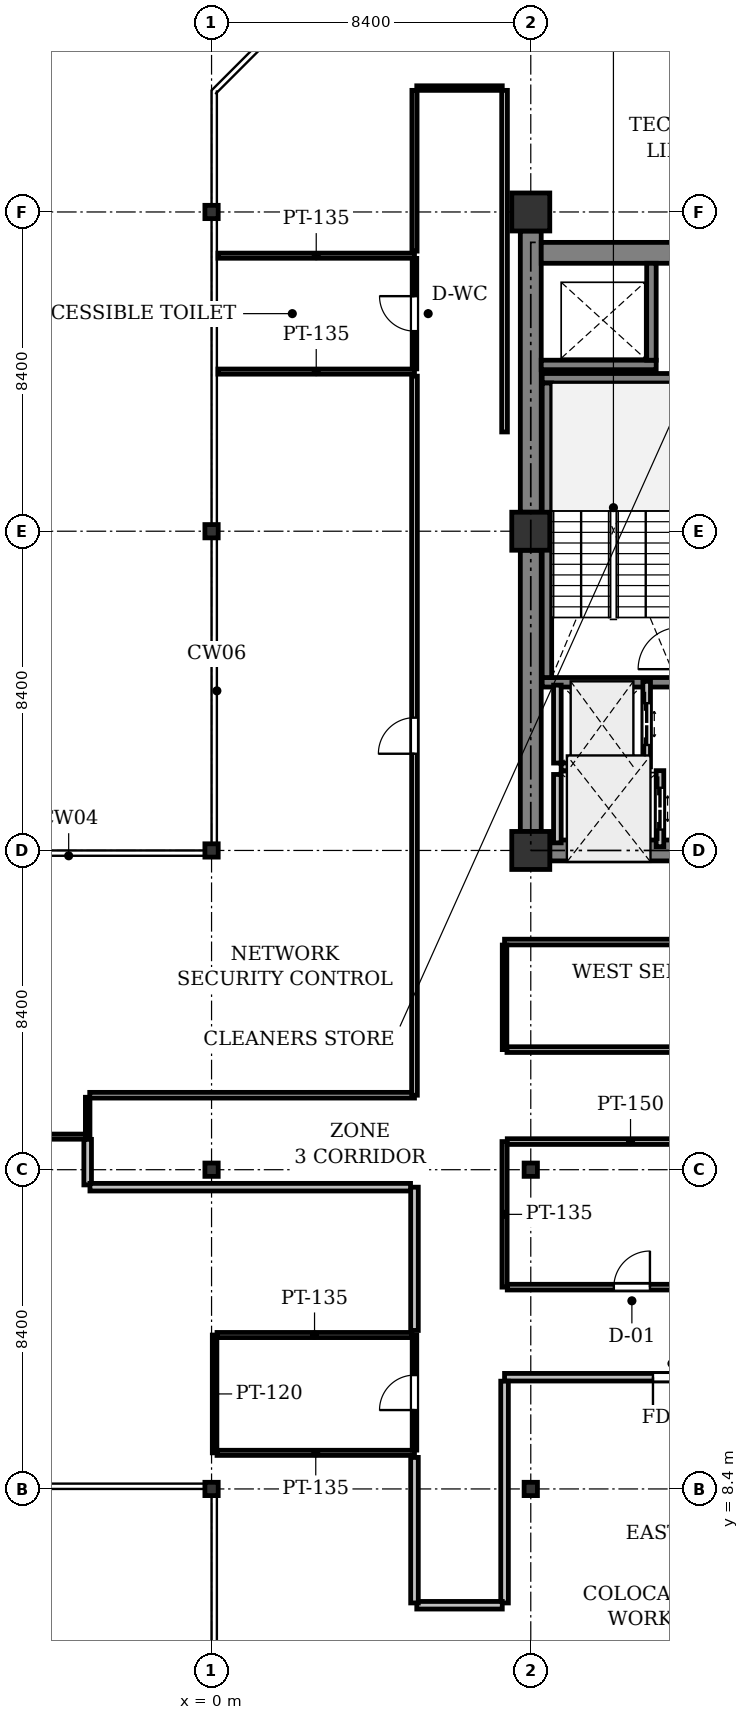
"""IFC4 building model, lengths in metres.
Left out: names, types, materials, properties, quantities, classifications, styles, units other than length and angle.
Written with IfcOpenShell. Run it as: python <this file> out.ifc"""

import sys

from ifc_helpers import new_model, si_unit, direction, frame, frame_2d, origin, origin_2d, place, context, subcontext, project, spatial, rectangle, i_section, extrude, element, fill, save


model = new_model("IFC4")
c1 = context("Model", 3, precision=1e-05, world=origin(), true_north=direction((0.0, 1.0)))
c2 = subcontext(c1, "Body", "Model", "MODEL_VIEW")
j1 = project(units=[si_unit("LENGTHUNIT", "METRE"), si_unit("PLANEANGLEUNIT", "RADIAN")], contexts=[c1])
p1 = place(None, origin())
s1 = spatial("IfcSite", under=j1, at=p1, CompositionType="ELEMENT")
p2 = place(p1, origin())
s2 = spatial("IfcBuilding", under=s1, at=p2, CompositionType="ELEMENT")
p3 = place(p2, frame((0.0, 0.0, 196.0)))
s3 = spatial("IfcBuildingStorey", under=s2, at=p3, CompositionType="ELEMENT", Elevation=196.0)
for number, where, z_axis, x_axis in (
    (1, (0.0, 8.4, 0.0), (0.0, 0.0, 1.0), (1.0, 0.0, 0.0)),
    (2, (0.0, 16.8, 0.0), (0.0, 0.0, 1.0), (1.0, 0.0, 0.0)),
    (3, (0.0, 25.2, 0.0), (0.0, 0.0, 1.0), (1.0, 0.0, 0.0)),
    (4, (0.0, 33.6, 0.0), (0.0, 0.0, 1.0), (1.0, 0.0, 0.0)),
    (5, (0.0, 42.0, 0.0), (0.0, 0.0, 1.0), (1.0, 0.0, 0.0)),
    (6, (8.4, 8.4, 0.0), (0.0, 0.0, 1.0), (1.0, 0.0, 0.0)),
    (7, (8.4, 16.8, 0.0), (0.0, 0.0, 1.0), (1.0, 0.0, 0.0)),
):
    element("IfcColumn", number, at=place(p3, frame(where, z_axis=z_axis, x_axis=x_axis)), inside=s3, PredefinedType="COLUMN", context=c2, shape_type="SweptSolid", body=[
        extrude(i_section(OverallWidth=0.35, OverallDepth=0.35, WebThickness=0.02, FlangeThickness=0.032, at=origin_2d()), origin(), (0.0, 0.0, 1.0), 4.1),
    ])
for number, where, z_axis, x_axis in (
    (8, (8.4, 25.2, 0.0), (0.0, 0.0, 1.0), (1.0, 0.0, 0.0)),
    (9, (8.4, 33.6, 0.0), (0.0, 0.0, 1.0), (1.0, 0.0, 0.0)),
    (10, (8.4, 42.0, 0.0), (0.0, 0.0, 1.0), (1.0, 0.0, 0.0)),
):
    element("IfcColumn", number, at=place(p3, frame(where, z_axis=z_axis, x_axis=x_axis)), inside=s3, PredefinedType="COLUMN", context=c2, shape_type="SweptSolid", body=[
        extrude(rectangle(XDim=1.0, YDim=1.0, at=origin_2d()), origin(), (0.0, 0.0, 1.0), 4.1),
    ])
p4 = place(p3, frame((8.4, 25.7, 0.0), z_axis=(0.0, 0.0, 1.0), x_axis=(0.0, 1.0, 0.0)))
e11 = element("IfcWall", 11, at=p4, inside=s3, PredefinedType="SHEAR", context=c2, shape_type="SweptSolid", body=[
    extrude(rectangle(XDim=7.4, YDim=0.55, at=frame_2d((3.7, 0.0))), origin(), (0.0, 0.0, 1.0), 3.825),
])
p5 = place(p3, frame((8.4, 34.1, 0.0), z_axis=(0.0, 0.0, 1.0), x_axis=(0.0, 1.0, 0.0)))
e12 = element("IfcWall", 12, at=p5, inside=s3, PredefinedType="SHEAR", context=c2, shape_type="SweptSolid", body=[
    extrude(rectangle(XDim=7.4, YDim=0.55, at=frame_2d((3.7, 0.0))), origin(), (0.0, 0.0, 1.0), 3.825),
])
p6 = place(p3, frame((8.675, 40.925, 0.0), z_axis=(0.0, 0.0, 1.0), x_axis=(1.0, 0.0, 0.0)))
e13 = element("IfcWall", 13, at=p6, inside=s3, PredefinedType="SHEAR", context=c2, shape_type="SweptSolid", body=[
    extrude(rectangle(XDim=7.85, YDim=0.55, at=frame_2d((3.925, 0.0))), origin(), (0.0, 0.0, 1.0), 3.825),
])
p7 = place(p3, frame((8.9, 25.2, 0.0), z_axis=(0.0, 0.0, 1.0), x_axis=(1.0, 0.0, 0.0)))
e14 = element("IfcWall", 14, at=p7, inside=s3, PredefinedType="SHEAR", context=c2, shape_type="SweptSolid", body=[
    extrude(rectangle(XDim=7.4, YDim=0.55, at=frame_2d((3.7, 0.0))), origin(), (0.0, 0.0, 1.0), 3.825),
])
p8 = place(p7, frame((3.8, 0.0, 0.0)))
e15 = element("IfcOpeningElement", 15, at=p8, cuts=e14, PredefinedType="OPENING", context=c2, shape_type="SweptSolid", body=[
    extrude(rectangle(XDim=1.1, YDim=2.15, at=frame_2d((0.55, 1.075))), frame((0.0, 0.285, 0.0), z_axis=(0.0, -1.0, 0.0), x_axis=(1.0, 0.0, 0.0)), (0.0, 0.0, 1.0), 0.57),
])
for number, where, z_axis, x_axis in (
    (16, (12.45, 29.625, 0.0), (0.0, 0.0, 1.0), (-1.0, 0.0, 0.0)),
    (17, (12.45, 37.625, 0.0), (0.0, 0.0, 1.0), (-1.0, 0.0, 0.0)),
):
    element("IfcWall", number, at=place(p3, frame(where, z_axis=z_axis, x_axis=x_axis)), inside=s3, PredefinedType="SHEAR", context=c2, shape_type="SweptSolid", body=[
        extrude(rectangle(XDim=3.75, YDim=0.25, at=frame_2d((1.875, 0.0))), origin(), (0.0, 0.0, 1.0), 3.825),
    ])
p9 = place(p3, frame((8.825, 29.75, 0.0), z_axis=(0.0, 0.0, 1.0), x_axis=(0.0, 1.0, 0.0)))
e18 = element("IfcWall", 18, at=p9, inside=s3, PredefinedType="SHEAR", context=c2, shape_type="SweptSolid", body=[
    extrude(rectangle(XDim=7.75, YDim=0.25, at=frame_2d((3.875, 0.0))), origin(), (0.0, 0.0, 1.0), 3.825),
])
p10 = place(p3, frame((8.675, 37.975, 0.0), z_axis=(0.0, 0.0, 1.0), x_axis=(1.0, 0.0, 0.0)))
e19 = element("IfcWall", 19, at=p10, inside=s3, PredefinedType="SHEAR", context=c2, shape_type="SweptSolid", body=[
    extrude(rectangle(XDim=3.025, YDim=0.25, at=frame_2d((1.512, 0.0))), origin(), (0.0, 0.0, 1.0), 3.825),
])
p11 = place(p3, frame((11.575, 38.1, 0.0), z_axis=(0.0, 0.0, 1.0), x_axis=(0.0, 1.0, 0.0)))
e20 = element("IfcWall", 20, at=p11, inside=s3, PredefinedType="SHEAR", context=c2, shape_type="SweptSolid", body=[
    extrude(rectangle(XDim=2.55, YDim=0.25, at=frame_2d((1.275, 0.0))), origin(), (0.0, 0.0, 1.0), 3.825),
])
p12 = place(p3, frame((11.45, 27.4, 0.0), z_axis=(0.0, 0.0, 1.0), x_axis=(0.0, 1.0, 0.0)))
e21 = element("IfcWall", 21, at=p12, inside=s3, PredefinedType="PARTITIONING", context=c2, shape_type="SweptSolid", body=[
    extrude(rectangle(XDim=2.25, YDim=0.2, at=frame_2d((1.125, 0.0))), origin(), (0.0, 0.0, 1.0), 3.825),
])
p13 = place(p12, frame((0.575, 0.0, 0.0)))
e22 = element("IfcOpeningElement", 22, at=p13, cuts=e21, PredefinedType="OPENING", context=c2, shape_type="SweptSolid", body=[
    extrude(rectangle(XDim=1.1, YDim=2.2, at=frame_2d((0.55, 1.1))), frame((0.0, 0.11, 0.0), z_axis=(0.0, -1.0, 0.0), x_axis=(1.0, 0.0, 0.0)), (0.0, 0.0, 1.0), 0.22),
])
p14 = place(p3, frame((9.1, 27.5, 0.0), z_axis=(0.0, 0.0, 1.0), x_axis=(0.0, 1.0, 0.0)))
e23 = element("IfcWall", 23, at=p14, inside=s3, PredefinedType="PARTITIONING", context=c2, shape_type="SweptSolid", body=[
    extrude(rectangle(XDim=2.05, YDim=0.2, at=frame_2d((1.025, 0.0))), origin(), (0.0, 0.0, 1.0), 3.825),
])
p15 = place(p3, frame((9.2, 27.4, 0.0), z_axis=(0.0, 0.0, 1.0), x_axis=(1.0, 0.0, 0.0)))
e24 = element("IfcWall", 24, at=p15, inside=s3, PredefinedType="PARTITIONING", context=c2, shape_type="SweptSolid", body=[
    extrude(rectangle(XDim=2.15, YDim=0.2, at=frame_2d((1.075, 0.0))), origin(), (0.0, 0.0, 1.0), 3.825),
])
p16 = place(p3, frame((11.8, 25.3, 0.0), z_axis=(0.0, 0.0, 1.0), x_axis=(0.0, 1.0, 0.0)))
e25 = element("IfcWall", 25, at=p16, inside=s3, PredefinedType="PARTITIONING", context=c2, shape_type="SweptSolid", body=[
    extrude(rectangle(XDim=2.0, YDim=0.2, at=frame_2d((1.0, 0.0))), origin(), (0.0, 0.0, 1.0), 3.825),
])
p17 = place(p16, frame((0.45, 0.0, 0.0)))
e26 = element("IfcOpeningElement", 26, at=p17, cuts=e25, PredefinedType="OPENING", context=c2, shape_type="SweptSolid", body=[
    extrude(rectangle(XDim=1.1, YDim=2.2, at=frame_2d((0.55, 1.1))), frame((0.0, 0.11, 0.0), z_axis=(0.0, -1.0, 0.0), x_axis=(1.0, 0.0, 0.0)), (0.0, 0.0, 1.0), 0.22),
])
p18 = place(p3, frame((9.1, 25.4, 0.0), z_axis=(0.0, 0.0, 1.0), x_axis=(0.0, 1.0, 0.0)))
e27 = element("IfcWall", 27, at=p18, inside=s3, PredefinedType="PARTITIONING", context=c2, shape_type="SweptSolid", body=[
    extrude(rectangle(XDim=1.8, YDim=0.2, at=frame_2d((0.9, 0.0))), origin(), (0.0, 0.0, 1.0), 3.825),
])
for number, where, z_axis, x_axis in (
    (28, (5.34, 40.85, 0.0), (0.0, 0.0, 1.0), (-1.0, 0.0, 0.0)),
    (29, (0.169, 37.8, 0.0), (0.0, 0.0, 1.0), (1.0, 0.0, 0.0)),
):
    element("IfcWall", number, at=place(p3, frame(where, z_axis=z_axis, x_axis=x_axis)), inside=s3, PredefinedType="PARTITIONING", context=c2, shape_type="SweptSolid", body=[
        extrude(rectangle(XDim=5.171, YDim=0.135, at=frame_2d((2.585, 0.0))), origin(), (0.0, 0.0, 1.0), 3.518),
    ])
p19 = place(p3, frame((5.34, 37.872, 0.0), z_axis=(0.0, 0.0, 1.0), x_axis=(0.0, 1.0, 0.0)))
e30 = element("IfcWall", 30, at=p19, inside=s3, PredefinedType="PARTITIONING", context=c2, shape_type="SweptSolid", body=[
    extrude(rectangle(XDim=2.907, YDim=0.12, at=frame_2d((1.454, 0.0))), origin(), (0.0, 0.0, 1.0), 3.825),
])
p20 = place(p19, frame((0.993, 0.0, 0.0)))
e31 = element("IfcOpeningElement", 31, at=p20, cuts=e30, PredefinedType="OPENING", context=c2, shape_type="SweptSolid", body=[
    extrude(rectangle(XDim=0.92, YDim=2.1, at=frame_2d((0.46, 1.05))), frame((0.0, 0.07, 0.0), z_axis=(0.0, -1.0, 0.0), x_axis=(1.0, 0.0, 0.0)), (0.0, 0.0, 1.0), 0.14),
])
p21 = place(p3, frame((0.08, 12.45, 0.0), z_axis=(0.0, 0.0, 1.0), x_axis=(0.0, -1.0, 0.0)))
e32 = element("IfcWall", 32, at=p21, inside=s3, PredefinedType="PARTITIONING", context=c2, shape_type="SweptSolid", body=[
    extrude(rectangle(XDim=3.1, YDim=0.12, at=frame_2d((1.55, 0.0))), origin(), (0.0, 0.0, 1.0), 3.223),
])
p22 = place(p3, frame((0.144, 9.35, 0.0), z_axis=(0.0, 0.0, 1.0), x_axis=(1.0, 0.0, 0.0)))
e33 = element("IfcWall", 33, at=p22, inside=s3, PredefinedType="PARTITIONING", context=c2, shape_type="SweptSolid", body=[
    extrude(rectangle(XDim=5.196, YDim=0.135, at=frame_2d((2.598, 0.0))), origin(), (0.0, 0.0, 1.0), 3.518),
])
p23 = place(p3, frame((5.34, 9.421, 0.0), z_axis=(0.0, 0.0, 1.0), x_axis=(0.0, 1.0, 0.0)))
e34 = element("IfcWall", 34, at=p23, inside=s3, PredefinedType="PARTITIONING", context=c2, shape_type="SweptSolid", body=[
    extrude(rectangle(XDim=3.029, YDim=0.12, at=frame_2d((1.514, 0.0))), origin(), (0.0, 0.0, 1.0), 3.825),
])
p24 = place(p23, frame((1.054, 0.0, 0.0)))
e35 = element("IfcOpeningElement", 35, at=p24, cuts=e34, PredefinedType="OPENING", context=c2, shape_type="SweptSolid", body=[
    extrude(rectangle(XDim=0.92, YDim=2.1, at=frame_2d((0.46, 1.05))), frame((0.0, 0.07, 0.0), z_axis=(0.0, -1.0, 0.0), x_axis=(1.0, 0.0, 0.0)), (0.0, 0.0, 1.0), 0.14),
])
p25 = place(p3, frame((5.276, 12.45, 0.0), z_axis=(0.0, 0.0, 1.0), x_axis=(-1.0, 0.0, 0.0)))
e36 = element("IfcWall", 36, at=p25, inside=s3, PredefinedType="PARTITIONING", context=c2, shape_type="SweptSolid", body=[
    extrude(rectangle(XDim=5.132, YDim=0.135, at=frame_2d((2.566, 0.0))), origin(), (0.0, 0.0, 1.0), 3.518),
])
p26 = place(p3, frame((7.71, 17.54, 0.0), z_axis=(0.0, 0.0, 1.0), x_axis=(0.0, -1.0, 0.0)))
e37 = element("IfcWall", 37, at=p26, inside=s3, PredefinedType="PARTITIONING", context=c2, shape_type="SweptSolid", body=[
    extrude(rectangle(XDim=3.83, YDim=0.135, at=frame_2d((1.915, 0.0))), origin(), (0.0, 0.0, 1.0), 3.365),
])
p27 = place(p3, frame((7.781, 13.71, 0.0), z_axis=(0.0, 0.0, 1.0), x_axis=(1.0, 0.0, 0.0)))
e38 = element("IfcWall", 38, at=p27, inside=s3, PredefinedType="PARTITIONING", context=c2, shape_type="SweptSolid", body=[
    extrude(rectangle(XDim=6.559, YDim=0.15, at=frame_2d((3.279, 0.0))), origin(), (0.0, 0.0, 1.0), 3.371),
])
p28 = place(p27, frame((2.804, 0.0, 0.0)))
e39 = element("IfcOpeningElement", 39, at=p28, cuts=e38, PredefinedType="OPENING", context=c2, shape_type="SweptSolid", body=[
    extrude(rectangle(XDim=0.95, YDim=2.15, at=frame_2d((0.475, 1.075))), frame((0.0, 0.085, 0.0), z_axis=(0.0, -1.0, 0.0), x_axis=(1.0, 0.0, 0.0)), (0.0, 0.0, 1.0), 0.17),
])
p29 = place(p3, frame((14.269, 17.54, 0.0), z_axis=(0.0, 0.0, 1.0), x_axis=(-1.0, 0.0, 0.0)))
e40 = element("IfcWall", 40, at=p29, inside=s3, PredefinedType="PARTITIONING", context=c2, shape_type="SweptSolid", body=[
    extrude(rectangle(XDim=6.487, YDim=0.15, at=frame_2d((3.244, 0.0))), origin(), (0.0, 0.0, 1.0), 3.371),
])
p30 = place(p3, frame((19.9, 22.79, 0.0), z_axis=(0.0, 0.0, 1.0), x_axis=(-1.0, 0.0, 0.0)))
e41 = element("IfcWall", 41, at=p30, inside=s3, PredefinedType="PARTITIONING", context=c2, shape_type="SweptSolid", body=[
    extrude(rectangle(XDim=12.19, YDim=0.15, at=frame_2d((6.095, 0.0))), origin(), (0.0, 0.0, 1.0), 3.371),
])
p31 = place(p3, frame((7.71, 22.711, 0.0), z_axis=(0.0, 0.0, 1.0), x_axis=(0.0, -1.0, 0.0)))
e42 = element("IfcWall", 42, at=p31, inside=s3, PredefinedType="PARTITIONING", context=c2, shape_type="SweptSolid", body=[
    extrude(rectangle(XDim=2.751, YDim=0.12, at=frame_2d((1.375, 0.0))), origin(), (0.0, 0.0, 1.0), 3.825),
])
p32 = place(p3, frame((7.774, 19.96, 0.0), z_axis=(0.0, 0.0, 1.0), x_axis=(1.0, 0.0, 0.0)))
e43 = element("IfcWall", 43, at=p32, inside=s3, PredefinedType="PARTITIONING", context=c2, shape_type="SweptSolid", body=[
    extrude(rectangle(XDim=17.628, YDim=0.15, at=frame_2d((8.814, 0.0))), origin(), (0.0, 0.0, 1.0), 3.371),
])
p33 = place(p32, frame((8.339, 0.0, 0.0)))
e44 = element("IfcOpeningElement", 44, at=p33, cuts=e43, PredefinedType="OPENING", context=c2, shape_type="SweptSolid", body=[
    extrude(rectangle(XDim=0.95, YDim=2.15, at=frame_2d((0.475, 1.075))), frame((0.0, 0.085, 0.0), z_axis=(0.0, -1.0, 0.0), x_axis=(1.0, 0.0, 0.0)), (0.0, 0.0, 1.0), 0.17),
])
p34 = place(p3, frame((-7.376, 17.67, 0.0), z_axis=(0.0, 0.0, 1.0), x_axis=(1.0, 0.0, 0.0)))
e45 = element("IfcWall", 45, at=p34, inside=s3, PredefinedType="PARTITIONING", context=c2, shape_type="SweptSolid", body=[
    extrude(rectangle(XDim=4.116, YDim=0.135, at=frame_2d((2.058, 0.0))), origin(), (0.0, 0.0, 1.0), 3.825),
])
p35 = place(p3, frame((-3.26, 17.67, 0.0), z_axis=(0.0, 0.0, 1.0), x_axis=(0.000235682294, 0.999999972227, 0.0)))
e46 = element("IfcWall", 46, at=p35, inside=s3, PredefinedType="PARTITIONING", context=c2, shape_type="SweptSolid", body=[
    extrude(rectangle(XDim=1.036, YDim=0.12, at=frame_2d((0.518, 0.0))), origin(), (0.0, 0.0, 1.0), 3.825),
])
p36 = place(p3, frame((-3.206, 18.76, 0.0), z_axis=(0.0, 0.0, 1.0), x_axis=(0.999999999592, 2.8568164e-05, 0.0)))
e47 = element("IfcWall", 47, at=p36, inside=s3, PredefinedType="PARTITIONING", context=c2, shape_type="SweptSolid", body=[
    extrude(rectangle(XDim=8.546, YDim=0.15, at=frame_2d((4.273, 0.0))), origin(), (0.0, 0.0, 1.0), 3.223),
])
p37 = place(p3, frame((5.34, 18.76, 0.0), z_axis=(0.0, 0.0, 1.0), x_axis=(0.0, 1.0, 0.0)))
e48 = element("IfcWall", 48, at=p37, inside=s3, PredefinedType="PARTITIONING", context=c2, shape_type="SweptSolid", body=[
    extrude(rectangle(XDim=18.92, YDim=0.15, at=frame_2d((9.46, 0.0))), origin(), (0.0, 0.0, 1.0), 3.213),
])
p38 = place(p37, frame((8.985, 0.0, 0.0)))
e49 = element("IfcOpeningElement", 49, at=p38, cuts=e48, PredefinedType="OPENING", context=c2, shape_type="SweptSolid", body=[
    extrude(rectangle(XDim=0.95, YDim=2.15, at=frame_2d((0.475, 1.075))), frame((0.0, 0.085, 0.0), z_axis=(0.0, -1.0, 0.0), x_axis=(1.0, 0.0, 0.0)), (0.0, 0.0, 1.0), 0.17),
])
p39 = place(p3, frame((5.34, 40.97, 0.0), z_axis=(0.0, 0.0, 1.0), x_axis=(0.0, 1.0, 0.0)))
e50 = element("IfcWall", 50, at=p39, inside=s3, PredefinedType="PARTITIONING", context=c2, shape_type="SweptSolid", body=[
    extrude(rectangle(XDim=4.23, YDim=0.135, at=frame_2d((2.115, 0.0))), origin(), (0.0, 0.0, 1.0), 3.365),
])
p40 = place(p3, frame((5.4, 45.26, 0.0), z_axis=(0.0, 0.0, 1.0), x_axis=(1.0, 0.0, 0.0)))
e51 = element("IfcWall", 51, at=p40, inside=s3, PredefinedType="PARTITIONING", context=c2, shape_type="SweptSolid", body=[
    extrude(rectangle(XDim=2.25, YDim=0.12, at=frame_2d((1.125, 0.0))), origin(), (0.0, 0.0, 1.0), 3.825),
])
p41 = place(p3, frame((7.71, 45.2, 0.0), z_axis=(0.0, 0.0, 1.0), x_axis=(0.0, -1.0, 0.0)))
e52 = element("IfcWall", 52, at=p41, inside=s3, PredefinedType="PARTITIONING", context=c2, shape_type="SweptSolid", body=[
    extrude(rectangle(XDim=8.988, YDim=0.15, at=frame_2d((4.494, 0.0))), origin(), (0.0, 0.0, 1.0), 3.365),
])
p42 = place(p3, frame((-3.26, 16.4, 0.0), z_axis=(0.0, 0.0, 1.0), x_axis=(0.0, 1.0, 0.0)))
e53 = element("IfcWall", 53, at=p42, inside=s3, PredefinedType="PARTITIONING", context=c2, shape_type="SweptSolid", body=[
    extrude(rectangle(XDim=1.198, YDim=0.2, at=frame_2d((0.599, 0.0))), origin(), (0.0, 0.0, 1.0), 2.915),
])
p43 = place(p3, frame((16.521, 11.34, 0.0), z_axis=(0.0, 0.0, 1.0), x_axis=(-1.0, 0.0, 0.0)))
e54 = element("IfcWall", 54, at=p43, inside=s3, PredefinedType="PARTITIONING", context=c2, shape_type="SweptSolid", body=[
    extrude(rectangle(XDim=8.811, YDim=0.2, at=frame_2d((4.406, 0.0))), origin(), (0.0, 0.0, 1.0), 3.371),
])
p44 = place(p43, frame((3.906, 0.0, 0.0)))
e55 = element("IfcOpeningElement", 55, at=p44, cuts=e54, PredefinedType="OPENING", context=c2, shape_type="SweptSolid", body=[
    extrude(rectangle(XDim=1.0, YDim=2.15, at=frame_2d((0.5, 1.075))), frame((0.0, 0.11, 0.0), z_axis=(0.0, -1.0, 0.0), x_axis=(1.0, 0.0, 0.0)), (0.0, 0.0, 1.0), 0.22),
])
p45 = place(p3, frame((7.71, 11.236, 0.0), z_axis=(0.0, 0.0, 1.0), x_axis=(0.0, -1.0, 0.0)))
e56 = element("IfcWall", 56, at=p45, inside=s3, PredefinedType="PARTITIONING", context=c2, shape_type="SweptSolid", body=[
    extrude(rectangle(XDim=5.836, YDim=0.2, at=frame_2d((2.918, 0.0))), origin(), (0.0, 0.0, 1.0), 3.213),
])
p46 = place(p3, frame((7.65, 5.34, 0.0), z_axis=(0.0, 0.0, 1.0), x_axis=(-1.0, 0.0, 0.0)))
e57 = element("IfcWall", 57, at=p46, inside=s3, PredefinedType="PARTITIONING", context=c2, shape_type="SweptSolid", body=[
    extrude(rectangle(XDim=2.25, YDim=0.2, at=frame_2d((1.125, 0.0))), origin(), (0.0, 0.0, 1.0), 3.825),
])
p47 = place(p3, frame((5.34, 5.4, 0.0), z_axis=(0.0, 0.0, 1.0), x_axis=(0.0, 1.0, 0.0)))
e58 = element("IfcWall", 58, at=p47, inside=s3, PredefinedType="PARTITIONING", context=c2, shape_type="SweptSolid", body=[
    extrude(rectangle(XDim=3.83, YDim=0.2, at=frame_2d((1.915, 0.0))), origin(), (0.0, 0.0, 1.0), 3.213),
])
p48 = place(p3, frame((5.34, 12.57, 0.0), z_axis=(0.0, 0.0, 1.0), x_axis=(0.0, 1.0, 0.0)))
e59 = element("IfcWall", 59, at=p48, inside=s3, PredefinedType="PARTITIONING", context=c2, shape_type="SweptSolid", body=[
    extrude(rectangle(XDim=3.77, YDim=0.2, at=frame_2d((1.885, 0.0))), origin(), (0.0, 0.0, 1.0), 3.825),
])
p49 = place(p3, frame((5.236, 16.34, 0.0), z_axis=(0.0, 0.0, 1.0), x_axis=(-1.0, 0.0, 0.0)))
e60 = element("IfcWall", 60, at=p49, inside=s3, PredefinedType="PARTITIONING", context=c2, shape_type="SweptSolid", body=[
    extrude(rectangle(XDim=8.436, YDim=0.2, at=frame_2d((4.218, 0.0))), origin(), (0.0, 0.0, 1.0), 3.223),
])
p50 = place(p13, origin())
e61 = element("IfcDoor", 61, at=p50, inside=s3, OperationType="DOUBLE_DOOR_SLIDING", PredefinedType="DOOR", context=c2, shape_type="SweptSolid", body=[
    extrude(rectangle(XDim=1.1, YDim=2.2, at=frame_2d((0.55, 1.1))), frame((0.0, 0.025, 0.0), z_axis=(0.0, -1.0, 0.0), x_axis=(1.0, 0.0, 0.0)), (0.0, 0.0, 1.0), 0.05),
])
fill(e22, e61)
p51 = place(p17, origin())
e62 = element("IfcDoor", 62, at=p51, inside=s3, OperationType="DOUBLE_DOOR_SLIDING", PredefinedType="DOOR", context=c2, shape_type="SweptSolid", body=[
    extrude(rectangle(XDim=1.1, YDim=2.2, at=frame_2d((0.55, 1.1))), frame((0.0, 0.025, 0.0), z_axis=(0.0, -1.0, 0.0), x_axis=(1.0, 0.0, 0.0)), (0.0, 0.0, 1.0), 0.05),
])
fill(e26, e62)
p52 = place(p20, origin())
e63 = element("IfcDoor", 63, at=p52, inside=s3, OperationType="SINGLE_SWING_RIGHT", PredefinedType="DOOR", context=c2, shape_type="SweptSolid", body=[
    extrude(rectangle(XDim=0.92, YDim=2.1, at=frame_2d((0.46, 1.05))), frame((0.0, 0.025, 0.0), z_axis=(0.0, -1.0, 0.0), x_axis=(1.0, 0.0, 0.0)), (0.0, 0.0, 1.0), 0.05),
])
fill(e31, e63)
p53 = place(p24, origin())
e64 = element("IfcDoor", 64, at=p53, inside=s3, OperationType="SINGLE_SWING_LEFT", PredefinedType="DOOR", context=c2, shape_type="SweptSolid", body=[
    extrude(rectangle(XDim=0.92, YDim=2.1, at=frame_2d((0.46, 1.05))), frame((0.0, 0.025, 0.0), z_axis=(0.0, -1.0, 0.0), x_axis=(1.0, 0.0, 0.0)), (0.0, 0.0, 1.0), 0.05),
])
fill(e35, e64)
p54 = place(p28, origin())
e65 = element("IfcDoor", 65, at=p54, inside=s3, OperationType="SINGLE_SWING_RIGHT", PredefinedType="DOOR", context=c2, shape_type="SweptSolid", body=[
    extrude(rectangle(XDim=0.95, YDim=2.15, at=frame_2d((0.475, 1.075))), frame((0.0, 0.025, 0.0), z_axis=(0.0, -1.0, 0.0), x_axis=(1.0, 0.0, 0.0)), (0.0, 0.0, 1.0), 0.05),
])
fill(e39, e65)
p55 = place(p38, origin())
e66 = element("IfcDoor", 66, at=p55, inside=s3, OperationType="SINGLE_SWING_LEFT", PredefinedType="DOOR", context=c2, shape_type="SweptSolid", body=[
    extrude(rectangle(XDim=0.95, YDim=2.15, at=frame_2d((0.475, 1.075))), frame((0.0, 0.025, 0.0), z_axis=(0.0, -1.0, 0.0), x_axis=(1.0, 0.0, 0.0)), (0.0, 0.0, 1.0), 0.05),
])
fill(e49, e66)
p56 = place(p44, origin())
e67 = element("IfcDoor", 67, at=p56, inside=s3, OperationType="SINGLE_SWING_RIGHT", PredefinedType="DOOR", context=c2, shape_type="SweptSolid", body=[
    extrude(rectangle(XDim=1.0, YDim=2.15, at=frame_2d((0.5, 1.075))), frame((0.0, 0.025, 0.0), z_axis=(0.0, -1.0, 0.0), x_axis=(1.0, 0.0, 0.0)), (0.0, 0.0, 1.0), 0.05),
])
fill(e55, e67)
save(model, sys.argv[1])
